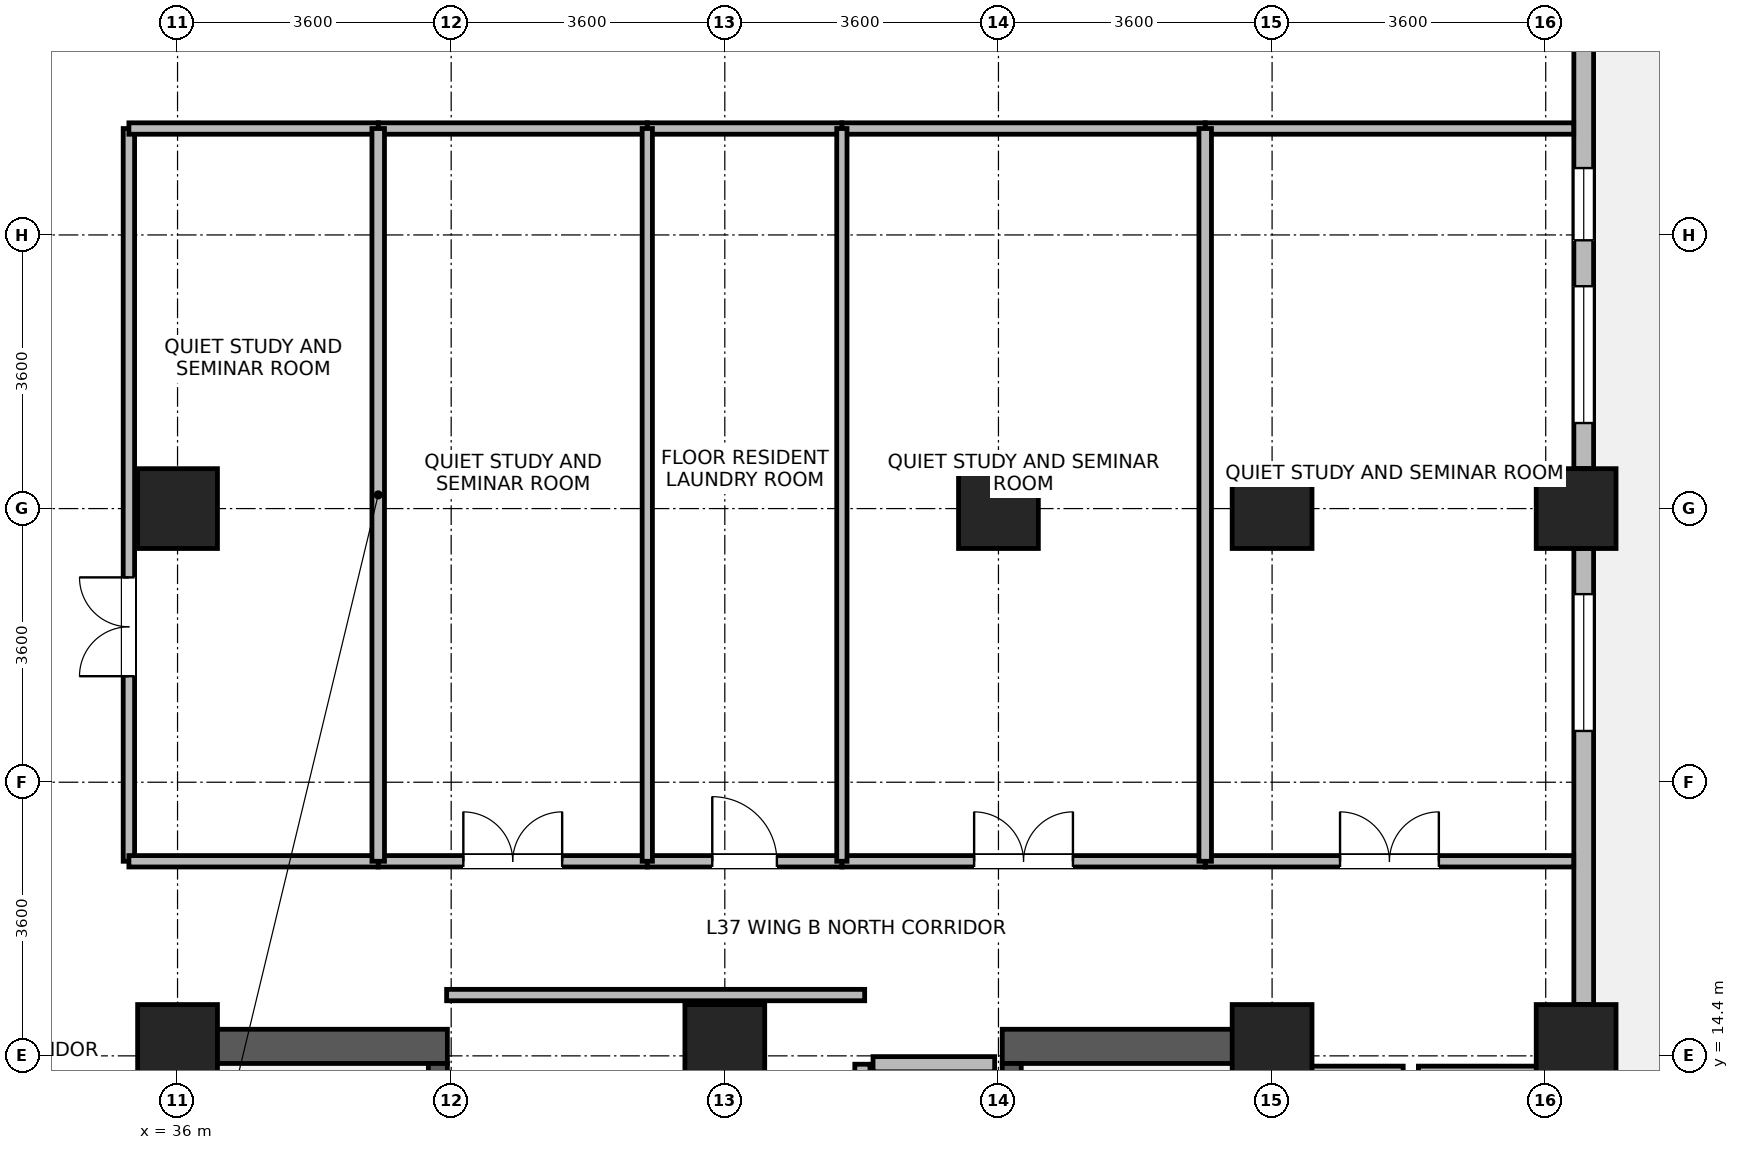
"""IFC4 building model, lengths in metres.
Left out: names, types, materials, properties, quantities, classifications, styles, units other than length and angle.
Written with IfcOpenShell. Run it as: python <this file> out.ifc"""

import sys

from ifc_helpers import new_model, si_unit, direction, frame, frame_2d, origin, origin_2d, place, context, subcontext, project, spatial, rectangle, extrude, source, transform, mapped, element, fill, save


model = new_model("IFC4")
c1 = context("Model", 3, precision=1e-05, world=origin(), true_north=direction((0.0, 1.0)))
c2 = subcontext(c1, "Body", "Model", "MODEL_VIEW")
j1 = project(units=[si_unit("LENGTHUNIT", "METRE"), si_unit("PLANEANGLEUNIT", "RADIAN")], contexts=[c1])
p1 = place(None, origin())
s1 = spatial("IfcSite", under=j1, at=p1, CompositionType="ELEMENT")
p2 = place(p1, origin())
s2 = spatial("IfcBuilding", under=s1, at=p2, CompositionType="ELEMENT")
p3 = place(p2, frame((0.0, 0.0, 147.6)))
s3 = spatial("IfcBuildingStorey", under=s2, at=p3, CompositionType="ELEMENT", Elevation=147.6)
for number, where, z_axis, x_axis in (
    (1, (36.125, 6.85, 0.0), (0.0, 0.0, 1.0), (0.0, 1.0, 0.0)),
    (2, (50.275, 6.85, 0.0), (0.0, 0.0, 1.0), (0.0, 1.0, 0.0)),
):
    element("IfcWall", number, at=place(p3, frame(where, z_axis=z_axis, x_axis=x_axis)), inside=s3, PredefinedType="SHEAR", context=c2, shape_type="SweptSolid", body=[
        extrude(rectangle(XDim=7.9, YDim=0.45, at=frame_2d((3.95, 0.0))), origin(), (0.0, 0.0, 1.0), 3.46),
    ])
for number, where, z_axis, x_axis in (
    (3, (36.35, 14.525, 0.0), (0.0, 0.0, 1.0), (1.0, 0.0, 0.0)),
    (4, (46.85, 14.525, 0.0), (0.0, 0.0, 1.0), (1.0, 0.0, 0.0)),
):
    element("IfcWall", number, at=place(p3, frame(where, z_axis=z_axis, x_axis=x_axis)), inside=s3, PredefinedType="SHEAR", context=c2, shape_type="SweptSolid", body=[
        extrude(rectangle(XDim=3.2, YDim=0.45, at=frame_2d((1.6, 0.0))), origin(), (0.0, 0.0, 1.0), 3.46),
    ])
p4 = place(p3, frame((39.425, 7.3, 0.0), z_axis=(0.0, 0.0, 1.0), x_axis=(0.0, 1.0, 0.0)))
e5 = element("IfcWall", 5, at=p4, inside=s3, PredefinedType="SHEAR", context=c2, shape_type="SweptSolid", body=[
    extrude(rectangle(XDim=7.0, YDim=0.25, at=frame_2d((3.5, 0.0))), origin(), (0.0, 0.0, 1.0), 3.46),
])
p5 = place(p4, frame((0.15, 0.0, 0.0)))
e6 = element("IfcOpeningElement", 6, at=p5, cuts=e5, PredefinedType="OPENING", context=c2, shape_type="SweptSolid", body=[
    extrude(rectangle(XDim=1.1, YDim=2.08, at=frame_2d((0.55, 1.04))), frame((0.0, 0.135, 0.0), z_axis=(0.0, -1.0, 0.0), x_axis=(1.0, 0.0, 0.0)), (0.0, 0.0, 1.0), 0.27),
])
p6 = place(p3, frame((46.975, 7.3, 0.0), z_axis=(0.0, 0.0, 1.0), x_axis=(0.0, 1.0, 0.0)))
e7 = element("IfcWall", 7, at=p6, inside=s3, PredefinedType="SHEAR", context=c2, shape_type="SweptSolid", body=[
    extrude(rectangle(XDim=7.0, YDim=0.25, at=frame_2d((3.5, 0.0))), origin(), (0.0, 0.0, 1.0), 3.46),
])
p7 = place(p6, frame((0.15, 0.0, 0.0)))
e8 = element("IfcOpeningElement", 8, at=p7, cuts=e7, PredefinedType="OPENING", context=c2, shape_type="SweptSolid", body=[
    extrude(rectangle(XDim=1.1, YDim=2.08, at=frame_2d((0.55, 1.04))), frame((0.0, 0.135, 0.0), z_axis=(0.0, -1.0, 0.0), x_axis=(1.0, 0.0, 0.0)), (0.0, 0.0, 1.0), 0.27),
])
m1 = source(origin(), c2, "Body", "SweptSolid", [
    extrude(rectangle(XDim=1.05, YDim=1.05, at=origin_2d()), origin(), (0.0, 0.0, 1.0), 3.7),
])
for number, where, z_axis, x_axis in (
    (9, (36.0, 21.6, 0.0), (0.0, 0.0, 1.0), (1.0, 0.0, 0.0)),
    (10, (46.8, 21.6, 0.0), (0.0, 0.0, 1.0), (1.0, 0.0, 0.0)),
    (11, (36.0, 14.55, 0.0), (0.0, 0.0, 1.0), (1.0, 0.0, 0.0)),
    (12, (43.2, 14.55, 0.0), (0.0, 0.0, 1.0), (1.0, 0.0, 0.0)),
    (13, (50.4, 14.55, 0.0), (0.0, 0.0, 1.0), (1.0, 0.0, 0.0)),
    (14, (50.4, 21.6, 0.0), (0.0, 0.0, 1.0), (1.0, 0.0, 0.0)),
    (15, (54.4, 14.55, 0.0), (0.0, 0.0, 1.0), (1.0, 0.0, 0.0)),
    (16, (54.4, 21.6, 0.0), (0.0, 0.0, 1.0), (1.0, 0.0, 0.0)),
):
    element("IfcColumn", number, at=place(p3, frame(where, z_axis=z_axis, x_axis=x_axis)), inside=s3, PredefinedType="COLUMN", context=c2, shape_type="MappedRepresentation", body=[
        mapped(m1, transform((0.0, 0.0, 0.0), x_axis=(1.0, 0.0, 0.0), y_axis=(0.0, 1.0, 0.0), z_axis=(0.0, 0.0, 1.0), scale=1.0)),
    ])
p8 = place(p3, frame((54.5, 21.074, 0.0), z_axis=(0.0, 0.0, 1.0), x_axis=(0.0, -1.0, 0.0)))
e17 = element("IfcWall", 17, at=p8, inside=s3, PredefinedType="STANDARD", context=c2, shape_type="SweptSolid", body=[
    extrude(rectangle(XDim=5.998, YDim=0.26, at=frame_2d((2.999, 0.0))), origin(), (0.0, 0.0, 1.0), 2.99),
])
p9 = place(p8, frame((0.6, 0.0, 0.85)))
e18 = element("IfcOpeningElement", 18, at=p9, cuts=e17, PredefinedType="OPENING", context=c2, shape_type="SweptSolid", body=[
    extrude(rectangle(XDim=1.8, YDim=1.85, at=frame_2d((0.9, 0.925))), frame((0.0, 0.14, 0.0), z_axis=(0.0, -1.0, 0.0), x_axis=(1.0, 0.0, 0.0)), (0.0, 0.0, 1.0), 0.28),
])
p10 = place(p3, frame((54.5, 28.124, 0.0), z_axis=(0.0, 0.0, 1.0), x_axis=(0.0, -1.0, 0.0)))
e19 = element("IfcWall", 19, at=p10, inside=s3, PredefinedType="STANDARD", context=c2, shape_type="SweptSolid", body=[
    extrude(rectangle(XDim=5.998, YDim=0.26, at=frame_2d((2.999, 0.0))), origin(), (0.0, 0.0, 1.0), 2.99),
])
p11 = place(p10, frame((3.598, 0.0, 0.85)))
e20 = element("IfcOpeningElement", 20, at=p11, cuts=e19, PredefinedType="OPENING", context=c2, shape_type="SweptSolid", body=[
    extrude(rectangle(XDim=1.8, YDim=1.85, at=frame_2d((0.9, 0.925))), frame((0.0, 0.14, 0.0), z_axis=(0.0, -1.0, 0.0), x_axis=(1.0, 0.0, 0.0)), (0.0, 0.0, 1.0), 0.28),
])
p12 = place(p10, frame((2.044, 0.0, 0.85)))
e21 = element("IfcOpeningElement", 21, at=p12, cuts=e19, PredefinedType="OPENING", context=c2, shape_type="SweptSolid", body=[
    extrude(rectangle(XDim=0.95, YDim=1.75, at=frame_2d((0.475, 0.875))), frame((0.0, 0.14, 0.0), z_axis=(0.0, -1.0, 0.0), x_axis=(1.0, 0.0, 0.0)), (0.0, 0.0, 1.0), 0.28),
])
p13 = place(p3, frame((50.475, 14.165, 0.0), z_axis=(0.0, 0.0, 1.0), x_axis=(1.0, 0.0, 0.0)))
e22 = element("IfcWall", 22, at=p13, inside=s3, PredefinedType="PARTITIONING", context=c2, shape_type="SweptSolid", body=[
    extrude(rectangle(XDim=1.65, YDim=0.2, at=frame_2d((0.825, 0.0))), origin(), (0.0, 0.0, 1.0), 3.44),
])
p14 = place(p3, frame((52.325, 14.165, 0.0), z_axis=(0.0, 0.0, 1.0), x_axis=(1.0, 0.0, 0.0)))
e23 = element("IfcWall", 23, at=p14, inside=s3, PredefinedType="PARTITIONING", context=c2, shape_type="SweptSolid", body=[
    extrude(rectangle(XDim=1.65, YDim=0.2, at=frame_2d((0.825, 0.0))), origin(), (0.0, 0.0, 1.0), 3.44),
])
p15 = place(p3, frame((45.15, 14.29, 0.0), z_axis=(0.0, 0.0, 1.0), x_axis=(1.0, 0.0, 0.0)))
e24 = element("IfcWall", 24, at=p15, inside=s3, PredefinedType="PARTITIONING", context=c2, shape_type="SweptSolid", body=[
    extrude(rectangle(XDim=1.6, YDim=0.2, at=frame_2d((0.8, 0.0))), origin(), (0.0, 0.0, 1.0), 2.44),
])
p16 = place(p3, frame((45.01, 11.61, 0.0), z_axis=(0.0, 0.0, 1.0), x_axis=(0.0, 1.0, 0.0)))
e25 = element("IfcWall", 25, at=p16, inside=s3, PredefinedType="PARTITIONING", context=c2, shape_type="SweptSolid", body=[
    extrude(rectangle(XDim=2.68, YDim=0.2, at=frame_2d((1.34, 0.0))), origin(), (0.0, 0.0, 1.0), 3.44),
])
p17 = place(p3, frame((35.36, 16.96, 0.0), z_axis=(0.0, 0.0, 1.0), x_axis=(0.0, 1.0, 0.0)))
e26 = element("IfcWall", 26, at=p17, inside=s3, PredefinedType="PARTITIONING", context=c2, shape_type="SweptSolid", body=[
    extrude(rectangle(XDim=9.64, YDim=0.15, at=frame_2d((4.82, 0.0))), origin(), (0.0, 0.0, 1.0), 3.44),
])
p18 = place(p17, frame((2.435, 0.0, 0.0)))
e27 = element("IfcOpeningElement", 27, at=p18, cuts=e26, PredefinedType="OPENING", context=c2, shape_type="SweptSolid", body=[
    extrude(rectangle(XDim=1.3, YDim=2.12, at=frame_2d((0.65, 1.06))), frame((0.0, 0.085, 0.0), z_axis=(0.0, -1.0, 0.0), x_axis=(1.0, 0.0, 0.0)), (0.0, 0.0, 1.0), 0.17),
])
p19 = place(p3, frame((39.54, 15.2, 0.0), z_axis=(0.0, 0.0, 1.0), x_axis=(1.0, 0.0, 0.0)))
e28 = element("IfcWall", 28, at=p19, inside=s3, PredefinedType="PARTITIONING", context=c2, shape_type="SweptSolid", body=[
    extrude(rectangle(XDim=5.5, YDim=0.15, at=frame_2d((2.75, 0.0))), origin(), (0.0, 0.0, 1.0), 3.44),
])
p20 = place(p3, frame((49.52, 16.96, 0.0), z_axis=(0.0, 0.0, 1.0), x_axis=(1.0, 0.0, 0.0)))
e29 = element("IfcWall", 29, at=p20, inside=s3, PredefinedType="PARTITIONING", context=c2, shape_type="SweptSolid", body=[
    extrude(rectangle(XDim=4.848, YDim=0.15, at=frame_2d((2.424, 0.0))), origin(), (0.0, 0.0, 1.0), 3.44),
])
p21 = place(p20, frame((1.774, 0.0, 0.0)))
e30 = element("IfcOpeningElement", 30, at=p21, cuts=e29, PredefinedType="OPENING", context=c2, shape_type="SweptSolid", body=[
    extrude(rectangle(XDim=1.3, YDim=2.12, at=frame_2d((0.65, 1.06))), frame((0.0, 0.085, 0.0), z_axis=(0.0, -1.0, 0.0), x_axis=(1.0, 0.0, 0.0)), (0.0, 0.0, 1.0), 0.17),
])
p22 = place(p3, frame((49.52, 26.6, 0.0), z_axis=(0.0, 0.0, 1.0), x_axis=(1.0, 0.0, 0.0)))
e31 = element("IfcWall", 31, at=p22, inside=s3, PredefinedType="PARTITIONING", context=c2, shape_type="SweptSolid", body=[
    extrude(rectangle(XDim=4.848, YDim=0.15, at=frame_2d((2.424, 0.0))), origin(), (0.0, 0.0, 1.0), 3.44),
])
p23 = place(p3, frame((44.74, 16.96, 0.0), z_axis=(0.0, 0.0, 1.0), x_axis=(1.0, 0.0, 0.0)))
e32 = element("IfcWall", 32, at=p23, inside=s3, PredefinedType="PARTITIONING", context=c2, shape_type="SweptSolid", body=[
    extrude(rectangle(XDim=4.78, YDim=0.15, at=frame_2d((2.39, 0.0))), origin(), (0.0, 0.0, 1.0), 3.44),
])
p24 = place(p23, frame((1.74, 0.0, 0.0)))
e33 = element("IfcOpeningElement", 33, at=p24, cuts=e32, PredefinedType="OPENING", context=c2, shape_type="SweptSolid", body=[
    extrude(rectangle(XDim=1.3, YDim=2.12, at=frame_2d((0.65, 1.06))), frame((0.0, 0.085, 0.0), z_axis=(0.0, -1.0, 0.0), x_axis=(1.0, 0.0, 0.0)), (0.0, 0.0, 1.0), 0.17),
])
p25 = place(p3, frame((44.74, 26.6, 0.0), z_axis=(0.0, 0.0, 1.0), x_axis=(1.0, 0.0, 0.0)))
e34 = element("IfcWall", 34, at=p25, inside=s3, PredefinedType="PARTITIONING", context=c2, shape_type="SweptSolid", body=[
    extrude(rectangle(XDim=4.78, YDim=0.15, at=frame_2d((2.39, 0.0))), origin(), (0.0, 0.0, 1.0), 3.44),
])
p26 = place(p3, frame((38.64, 16.96, 0.0), z_axis=(0.0, 0.0, 1.0), x_axis=(1.0, 0.0, 0.0)))
e35 = element("IfcWall", 35, at=p26, inside=s3, PredefinedType="PARTITIONING", context=c2, shape_type="SweptSolid", body=[
    extrude(rectangle(XDim=3.54, YDim=0.15, at=frame_2d((1.77, 0.0))), origin(), (0.0, 0.0, 1.0), 3.44),
])
p27 = place(p26, frame((1.12, 0.0, 0.0)))
e36 = element("IfcOpeningElement", 36, at=p27, cuts=e35, PredefinedType="OPENING", context=c2, shape_type="SweptSolid", body=[
    extrude(rectangle(XDim=1.3, YDim=2.12, at=frame_2d((0.65, 1.06))), frame((0.0, 0.085, 0.0), z_axis=(0.0, -1.0, 0.0), x_axis=(1.0, 0.0, 0.0)), (0.0, 0.0, 1.0), 0.17),
])
p28 = place(p3, frame((38.64, 26.6, 0.0), z_axis=(0.0, 0.0, 1.0), x_axis=(1.0, 0.0, 0.0)))
e37 = element("IfcWall", 37, at=p28, inside=s3, PredefinedType="PARTITIONING", context=c2, shape_type="SweptSolid", body=[
    extrude(rectangle(XDim=3.54, YDim=0.15, at=frame_2d((1.77, 0.0))), origin(), (0.0, 0.0, 1.0), 3.44),
])
for number, where, z_axis, x_axis in (
    (38, (35.36, 16.96, 0.0), (0.0, 0.0, 1.0), (1.0, 0.0, 0.0)),
    (39, (35.36, 26.6, 0.0), (0.0, 0.0, 1.0), (1.0, 0.0, 0.0)),
):
    element("IfcWall", number, at=place(p3, frame(where, z_axis=z_axis, x_axis=x_axis)), inside=s3, PredefinedType="PARTITIONING", context=c2, shape_type="SweptSolid", body=[
        extrude(rectangle(XDim=3.28, YDim=0.15, at=frame_2d((1.64, 0.0))), origin(), (0.0, 0.0, 1.0), 3.44),
    ])
p29 = place(p3, frame((42.18, 16.96, 0.0), z_axis=(0.0, 0.0, 1.0), x_axis=(1.0, 0.0, 0.0)))
e40 = element("IfcWall", 40, at=p29, inside=s3, PredefinedType="PARTITIONING", context=c2, shape_type="SweptSolid", body=[
    extrude(rectangle(XDim=2.56, YDim=0.15, at=frame_2d((1.28, 0.0))), origin(), (0.0, 0.0, 1.0), 3.44),
])
p30 = place(p29, frame((0.855, 0.0, 0.0)))
e41 = element("IfcOpeningElement", 41, at=p30, cuts=e40, PredefinedType="OPENING", context=c2, shape_type="SweptSolid", body=[
    extrude(rectangle(XDim=0.85, YDim=2.04, at=frame_2d((0.425, 1.02))), frame((0.0, 0.085, 0.0), z_axis=(0.0, -1.0, 0.0), x_axis=(1.0, 0.0, 0.0)), (0.0, 0.0, 1.0), 0.17),
])
p31 = place(p3, frame((42.18, 26.6, 0.0), z_axis=(0.0, 0.0, 1.0), x_axis=(1.0, 0.0, 0.0)))
e42 = element("IfcWall", 42, at=p31, inside=s3, PredefinedType="PARTITIONING", context=c2, shape_type="SweptSolid", body=[
    extrude(rectangle(XDim=2.56, YDim=0.15, at=frame_2d((1.28, 0.0))), origin(), (0.0, 0.0, 1.0), 3.44),
])
p32 = place(p3, frame((38.64, 16.96, 0.0), z_axis=(0.0, 0.0, 1.0), x_axis=(0.0, 1.0, 0.0)))
e43 = element("IfcWall", 43, at=p32, inside=s3, PredefinedType="PARTITIONING", context=c2, shape_type="SweptSolid", body=[
    extrude(rectangle(XDim=9.64, YDim=0.165, at=frame_2d((4.82, 0.0))), origin(), (0.0, 0.0, 1.0), 3.44),
])
for number, where, z_axis, x_axis in (
    (44, (42.18, 16.96, 0.0), (0.0, 0.0, 1.0), (0.0, 1.0, 0.0)),
    (45, (44.74, 16.96, 0.0), (0.0, 0.0, 1.0), (0.0, 1.0, 0.0)),
):
    element("IfcWall", number, at=place(p3, frame(where, z_axis=z_axis, x_axis=x_axis)), inside=s3, PredefinedType="PARTITIONING", context=c2, shape_type="SweptSolid", body=[
        extrude(rectangle(XDim=9.64, YDim=0.135, at=frame_2d((4.82, 0.0))), origin(), (0.0, 0.0, 1.0), 3.44),
    ])
p33 = place(p3, frame((49.52, 16.96, 0.0), z_axis=(0.0, 0.0, 1.0), x_axis=(0.0, 1.0, 0.0)))
e46 = element("IfcWall", 46, at=p33, inside=s3, PredefinedType="PARTITIONING", context=c2, shape_type="SweptSolid", body=[
    extrude(rectangle(XDim=9.64, YDim=0.165, at=frame_2d((4.82, 0.0))), origin(), (0.0, 0.0, 1.0), 3.44),
])
p34 = place(p9, origin())
e47 = element("IfcWindow", 47, at=p34, inside=s3, PartitioningType="SINGLE_PANEL", PredefinedType="WINDOW", context=c2, shape_type="SweptSolid", body=[
    extrude(rectangle(XDim=1.8, YDim=1.85, at=frame_2d((0.9, 0.925))), frame((0.0, 0.03, 0.0), z_axis=(0.0, -1.0, 0.0), x_axis=(1.0, 0.0, 0.0)), (0.0, 0.0, 1.0), 0.06),
])
fill(e18, e47)
p35 = place(p11, origin())
e48 = element("IfcWindow", 48, at=p35, inside=s3, PartitioningType="SINGLE_PANEL", PredefinedType="WINDOW", context=c2, shape_type="SweptSolid", body=[
    extrude(rectangle(XDim=1.8, YDim=1.85, at=frame_2d((0.9, 0.925))), frame((0.0, 0.03, 0.0), z_axis=(0.0, -1.0, 0.0), x_axis=(1.0, 0.0, 0.0)), (0.0, 0.0, 1.0), 0.06),
])
fill(e20, e48)
p36 = place(p12, origin())
e49 = element("IfcWindow", 49, at=p36, inside=s3, PartitioningType="SINGLE_PANEL", PredefinedType="WINDOW", context=c2, shape_type="SweptSolid", body=[
    extrude(rectangle(XDim=0.95, YDim=1.75, at=frame_2d((0.475, 0.875))), frame((0.0, 0.03, 0.0), z_axis=(0.0, -1.0, 0.0), x_axis=(1.0, 0.0, 0.0)), (0.0, 0.0, 1.0), 0.06),
])
fill(e21, e49)
p37 = place(p18, origin())
e50 = element("IfcDoor", 50, at=p37, inside=s3, OperationType="DOUBLE_DOOR_SINGLE_SWING", PredefinedType="DOOR", context=c2, shape_type="SweptSolid", body=[
    extrude(rectangle(XDim=1.3, YDim=2.12, at=frame_2d((0.65, 1.06))), frame((0.0, 0.025, 0.0), z_axis=(0.0, -1.0, 0.0), x_axis=(1.0, 0.0, 0.0)), (0.0, 0.0, 1.0), 0.05),
])
fill(e27, e50)
p38 = place(p21, origin())
e51 = element("IfcDoor", 51, at=p38, inside=s3, OperationType="DOUBLE_DOOR_SINGLE_SWING", PredefinedType="DOOR", context=c2, shape_type="SweptSolid", body=[
    extrude(rectangle(XDim=1.3, YDim=2.12, at=frame_2d((0.65, 1.06))), frame((0.0, 0.025, 0.0), z_axis=(0.0, -1.0, 0.0), x_axis=(1.0, 0.0, 0.0)), (0.0, 0.0, 1.0), 0.05),
])
fill(e30, e51)
p39 = place(p24, origin())
e52 = element("IfcDoor", 52, at=p39, inside=s3, OperationType="DOUBLE_DOOR_SINGLE_SWING", PredefinedType="DOOR", context=c2, shape_type="SweptSolid", body=[
    extrude(rectangle(XDim=1.3, YDim=2.12, at=frame_2d((0.65, 1.06))), frame((0.0, 0.025, 0.0), z_axis=(0.0, -1.0, 0.0), x_axis=(1.0, 0.0, 0.0)), (0.0, 0.0, 1.0), 0.05),
])
fill(e33, e52)
p40 = place(p27, origin())
e53 = element("IfcDoor", 53, at=p40, inside=s3, OperationType="DOUBLE_DOOR_SINGLE_SWING", PredefinedType="DOOR", context=c2, shape_type="SweptSolid", body=[
    extrude(rectangle(XDim=1.3, YDim=2.12, at=frame_2d((0.65, 1.06))), frame((0.0, 0.025, 0.0), z_axis=(0.0, -1.0, 0.0), x_axis=(1.0, 0.0, 0.0)), (0.0, 0.0, 1.0), 0.05),
])
fill(e36, e53)
p41 = place(p30, origin())
e54 = element("IfcDoor", 54, at=p41, inside=s3, OperationType="SINGLE_SWING_LEFT", PredefinedType="DOOR", context=c2, shape_type="SweptSolid", body=[
    extrude(rectangle(XDim=0.85, YDim=2.04, at=frame_2d((0.425, 1.02))), frame((0.0, 0.025, 0.0), z_axis=(0.0, -1.0, 0.0), x_axis=(1.0, 0.0, 0.0)), (0.0, 0.0, 1.0), 0.05),
])
fill(e41, e54)
save(model, sys.argv[1])
